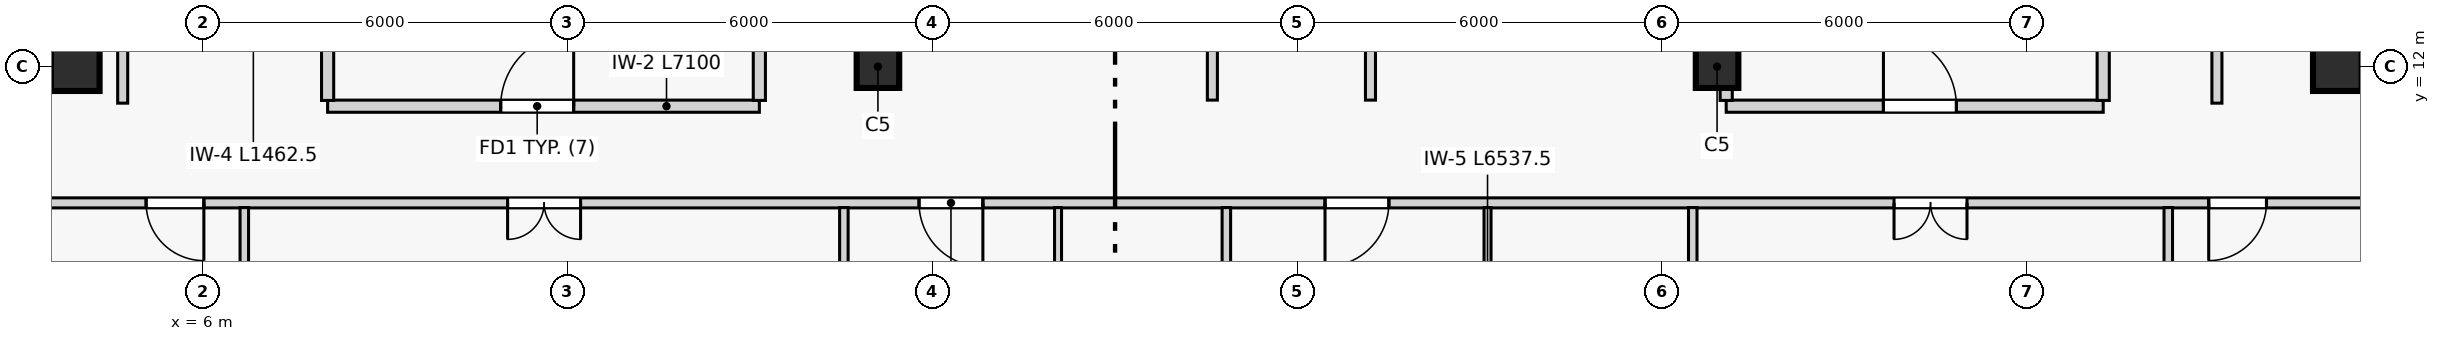
"""IFC4 building model, lengths in metres.
Left out: names, types, materials, properties, quantities, classifications, styles, units other than length and angle.
Written with IfcOpenShell. Run it as: python <this file> out.ifc"""

import sys

from ifc_helpers import new_model, si_unit, direction, frame, frame_2d, origin, origin_2d, place, context, subcontext, project, spatial, rectangle, extrude, source, transform, mapped, element, fill, save


model = new_model("IFC4")
c1 = context("Model", 3, precision=1e-05, world=origin(), true_north=direction((0.0, 1.0)))
c2 = subcontext(c1, "Body", "Model", "MODEL_VIEW")
j1 = project(units=[si_unit("LENGTHUNIT", "METRE"), si_unit("PLANEANGLEUNIT", "RADIAN")], contexts=[c1])
p1 = place(None, origin())
s1 = spatial("IfcSite", under=j1, at=p1, CompositionType="ELEMENT")
p2 = place(p1, origin())
s2 = spatial("IfcBuilding", under=s1, at=p2, CompositionType="ELEMENT")
p3 = place(p2, frame((0.0, 0.0, 267.3)))
s3 = spatial("IfcBuildingStorey", under=s2, at=p3, CompositionType="ELEMENT", Elevation=267.3)
m1 = source(origin(), c2, "Body", "SweptSolid", [
    extrude(rectangle(XDim=0.8, YDim=0.8, at=origin_2d()), origin(), (0.0, 0.0, 1.0), 3.6),
])
for number, where, z_axis, x_axis in (
    (1, (3.9, 12.0, 0.0), (0.0, 0.0, 1.0), (1.0, 0.0, 0.0)),
    (2, (41.1, 12.0, 0.0), (0.0, 0.0, 1.0), (1.0, 0.0, 0.0)),
):
    element("IfcColumn", number, at=place(p3, frame(where, z_axis=z_axis, x_axis=x_axis)), inside=s3, PredefinedType="COLUMN", context=c2, shape_type="MappedRepresentation", body=[
        mapped(m1, transform((0.0, 0.0, 0.0), scale=1.0)),
    ])
m2 = source(origin(), c2, "Body", "SweptSolid", [
    extrude(rectangle(XDim=0.7, YDim=0.7, at=origin_2d()), origin(), (0.0, 0.0, 1.0), 3.6),
])
for number, where, z_axis, x_axis in (
    (3, (17.1, 12.0, 0.0), (0.0, 0.0, 1.0), (1.0, 0.0, 0.0)),
    (4, (30.9, 12.0, 0.0), (0.0, 0.0, 1.0), (1.0, 0.0, 0.0)),
):
    element("IfcColumn", number, at=place(p3, frame(where, z_axis=z_axis, x_axis=x_axis)), inside=s3, PredefinedType="COLUMN", context=c2, shape_type="MappedRepresentation", body=[
        mapped(m2, transform((0.0, 0.0, 0.0), scale=1.0)),
    ])
p4 = place(p3, frame((8.05, 11.35, 0.0), z_axis=(0.0, 0.0, 1.0), x_axis=(1.0, 0.0, 0.0)))
e5 = element("IfcWall", 5, at=p4, inside=s3, PredefinedType="PARTITIONING", context=c2, shape_type="SweptSolid", body=[
    extrude(rectangle(XDim=7.1, YDim=0.2, at=frame_2d((3.55, 0.0))), origin(), (0.0, 0.0, 1.0), 3.32),
])
p5 = place(p4, frame((2.846, 0.0, 0.0)))
e6 = element("IfcOpeningElement", 6, at=p5, cuts=e5, PredefinedType="OPENING", context=c2, shape_type="SweptSolid", body=[
    extrude(rectangle(XDim=1.2, YDim=2.2, at=frame_2d((0.6, 1.1))), frame((0.0, 0.11, 0.0), z_axis=(0.0, -1.0, 0.0), x_axis=(1.0, 0.0, 0.0)), (0.0, 0.0, 1.0), 0.22),
])
for number, where, z_axis, x_axis in (
    (7, (8.05, 11.445, 0.0), (0.0, 0.0, 1.0), (0.0, 1.0, 0.0)),
    (8, (15.15, 11.445, 0.0), (0.0, 0.0, 1.0), (0.0, 1.0, 0.0)),
):
    element("IfcWall", number, at=place(p3, frame(where, z_axis=z_axis, x_axis=x_axis)), inside=s3, PredefinedType="PARTITIONING", context=c2, shape_type="SweptSolid", body=[
        extrude(rectangle(XDim=3.335, YDim=0.2, at=frame_2d((1.667, 0.0))), origin(), (0.0, 0.0, 1.0), 3.32),
    ])
p6 = place(p3, frame((31.05, 11.35, 0.0), z_axis=(0.0, 0.0, 1.0), x_axis=(1.0, 0.0, 0.0)))
e9 = element("IfcWall", 9, at=p6, inside=s3, PredefinedType="PARTITIONING", context=c2, shape_type="SweptSolid", body=[
    extrude(rectangle(XDim=6.2, YDim=0.2, at=frame_2d((3.1, 0.0))), origin(), (0.0, 0.0, 1.0), 3.32),
])
p7 = place(p6, frame((2.586, 0.0, 0.0)))
e10 = element("IfcOpeningElement", 10, at=p7, cuts=e9, PredefinedType="OPENING", context=c2, shape_type="SweptSolid", body=[
    extrude(rectangle(XDim=1.2, YDim=2.2, at=frame_2d((0.6, 1.1))), frame((0.0, 0.11, 0.0), z_axis=(0.0, -1.0, 0.0), x_axis=(1.0, 0.0, 0.0)), (0.0, 0.0, 1.0), 0.22),
])
p8 = place(p3, frame((31.05, 11.445, 0.0), z_axis=(0.0, 0.0, 1.0), x_axis=(0.0, 1.0, 0.0)))
e11 = element("IfcWall", 11, at=p8, inside=s3, PredefinedType="PARTITIONING", context=c2, shape_type="SweptSolid", body=[
    extrude(rectangle(XDim=3.335, YDim=0.2, at=frame_2d((1.667, 0.0))), origin(), (0.0, 0.0, 1.0), 2.47),
])
p9 = place(p3, frame((37.25, 11.445, 0.0), z_axis=(0.0, 0.0, 1.0), x_axis=(0.0, 1.0, 0.0)))
e12 = element("IfcWall", 12, at=p9, inside=s3, PredefinedType="PARTITIONING", context=c2, shape_type="SweptSolid", body=[
    extrude(rectangle(XDim=3.335, YDim=0.2, at=frame_2d((1.667, 0.0))), origin(), (0.0, 0.0, 1.0), 3.32),
])
p10 = place(p3, frame((3.145, 9.76, 0.0), z_axis=(0.0, 0.0, 1.0), x_axis=(1.0, 0.0, 0.0)))
e13 = element("IfcWall", 13, at=p10, inside=s3, PredefinedType="PARTITIONING", context=c2, shape_type="SweptSolid", body=[
    extrude(rectangle(XDim=38.71, YDim=0.165, at=frame_2d((19.355, 0.0))), origin(), (0.0, 0.0, 1.0), 3.32),
])
p11 = place(p10, frame((7.865, 0.0, 0.0)))
e14 = element("IfcOpeningElement", 14, at=p11, cuts=e13, PredefinedType="OPENING", context=c2, shape_type="SweptSolid", body=[
    extrude(rectangle(XDim=1.2, YDim=2.2, at=frame_2d((0.6, 1.1))), frame((0.0, 0.093, 0.0), z_axis=(0.0, -1.0, 0.0), x_axis=(1.0, 0.0, 0.0)), (0.0, 0.0, 1.0), 0.185),
])
p12 = place(p10, frame((14.631, 0.0, 0.0)))
e15 = element("IfcOpeningElement", 15, at=p12, cuts=e13, PredefinedType="OPENING", context=c2, shape_type="SweptSolid", body=[
    extrude(rectangle(XDim=1.05, YDim=2.15, at=frame_2d((0.525, 1.075))), frame((0.0, 0.093, 0.0), z_axis=(0.0, -1.0, 0.0), x_axis=(1.0, 0.0, 0.0)), (0.0, 0.0, 1.0), 0.185),
])
p13 = place(p10, frame((21.308, 0.0, 0.0)))
e16 = element("IfcOpeningElement", 16, at=p13, cuts=e13, PredefinedType="OPENING", context=c2, shape_type="SweptSolid", body=[
    extrude(rectangle(XDim=1.05, YDim=2.15, at=frame_2d((0.525, 1.075))), frame((0.0, 0.093, 0.0), z_axis=(0.0, -1.0, 0.0), x_axis=(1.0, 0.0, 0.0)), (0.0, 0.0, 1.0), 0.185),
])
p14 = place(p10, frame((30.665, 0.0, 0.0)))
e17 = element("IfcOpeningElement", 17, at=p14, cuts=e13, PredefinedType="OPENING", context=c2, shape_type="SweptSolid", body=[
    extrude(rectangle(XDim=1.2, YDim=2.2, at=frame_2d((0.6, 1.1))), frame((0.0, 0.093, 0.0), z_axis=(0.0, -1.0, 0.0), x_axis=(1.0, 0.0, 0.0)), (0.0, 0.0, 1.0), 0.185),
])
p15 = place(p10, frame((1.92, 0.0, 0.0)))
e18 = element("IfcOpeningElement", 18, at=p15, cuts=e13, PredefinedType="OPENING", context=c2, shape_type="SweptSolid", body=[
    extrude(rectangle(XDim=0.95, YDim=2.1, at=frame_2d((0.475, 1.05))), frame((0.0, 0.093, 0.0), z_axis=(0.0, -1.0, 0.0), x_axis=(1.0, 0.0, 0.0)), (0.0, 0.0, 1.0), 0.185),
])
p16 = place(p10, frame((35.84, 0.0, 0.0)))
e19 = element("IfcOpeningElement", 19, at=p16, cuts=e13, PredefinedType="OPENING", context=c2, shape_type="SweptSolid", body=[
    extrude(rectangle(XDim=0.95, YDim=2.1, at=frame_2d((0.475, 1.05))), frame((0.0, 0.093, 0.0), z_axis=(0.0, -1.0, 0.0), x_axis=(1.0, 0.0, 0.0)), (0.0, 0.0, 1.0), 0.185),
])
p17 = place(p3, frame((22.6, 11.45, 0.0), z_axis=(0.0, 0.0, 1.0), x_axis=(0.0, 1.0, 0.0)))
e20 = element("IfcWall", 20, at=p17, inside=s3, PredefinedType="PARTITIONING", context=c2, shape_type="SweptSolid", body=[
    extrude(rectangle(XDim=18.9, YDim=0.165, at=frame_2d((9.45, 0.0))), origin(), (0.0, 0.0, 1.0), 3.32),
])
p18 = place(p17, frame((8.825, 0.0, 0.0)))
e21 = element("IfcOpeningElement", 21, at=p18, cuts=e20, PredefinedType="OPENING", context=c2, shape_type="SweptSolid", body=[
    extrude(rectangle(XDim=1.25, YDim=2.2, at=frame_2d((0.625, 1.1))), frame((0.0, 0.093, 0.0), z_axis=(0.0, -1.0, 0.0), x_axis=(1.0, 0.0, 0.0)), (0.0, 0.0, 1.0), 0.185),
])
p19 = place(p3, frame((25.2, 11.45, 0.0), z_axis=(0.0, 0.0, 1.0), x_axis=(0.0, 1.0, 0.0)))
e22 = element("IfcWall", 22, at=p19, inside=s3, PredefinedType="PARTITIONING", context=c2, shape_type="SweptSolid", body=[
    extrude(rectangle(XDim=18.9, YDim=0.165, at=frame_2d((9.45, 0.0))), origin(), (0.0, 0.0, 1.0), 3.32),
])
p20 = place(p19, frame((8.825, 0.0, 0.0)))
e23 = element("IfcOpeningElement", 23, at=p20, cuts=e22, PredefinedType="OPENING", context=c2, shape_type="SweptSolid", body=[
    extrude(rectangle(XDim=1.25, YDim=2.2, at=frame_2d((0.625, 1.1))), frame((0.0, 0.093, 0.0), z_axis=(0.0, -1.0, 0.0), x_axis=(1.0, 0.0, 0.0)), (0.0, 0.0, 1.0), 0.185),
])
p21 = place(p3, frame((4.68, 11.4, 0.0), z_axis=(0.0, 0.0, 1.0), x_axis=(0.0, 1.0, 0.0)))
e24 = element("IfcWall", 24, at=p21, inside=s3, PredefinedType="PARTITIONING", context=c2, shape_type="SweptSolid", body=[
    extrude(rectangle(XDim=3.75, YDim=0.165, at=frame_2d((1.875, 0.0))), origin(), (0.0, 0.0, 1.0), 3.32),
])
p22 = place(p21, frame((1.5, 0.0, 0.0)))
e25 = element("IfcOpeningElement", 25, at=p22, cuts=e24, PredefinedType="OPENING", context=c2, shape_type="SweptSolid", body=[
    extrude(rectangle(XDim=0.95, YDim=2.1, at=frame_2d((0.475, 1.05))), frame((0.0, 0.093, 0.0), z_axis=(0.0, -1.0, 0.0), x_axis=(1.0, 0.0, 0.0)), (0.0, 0.0, 1.0), 0.185),
])
p23 = place(p3, frame((39.12, 11.4, 0.0), z_axis=(0.0, 0.0, 1.0), x_axis=(0.0, 1.0, 0.0)))
e26 = element("IfcWall", 26, at=p23, inside=s3, PredefinedType="PARTITIONING", context=c2, shape_type="SweptSolid", body=[
    extrude(rectangle(XDim=18.95, YDim=0.165, at=frame_2d((9.475, 0.0))), origin(), (0.0, 0.0, 1.0), 3.32),
])
p24 = place(p23, frame((2.075, 0.0, 0.0)))
e27 = element("IfcOpeningElement", 27, at=p24, cuts=e26, PredefinedType="OPENING", context=c2, shape_type="SweptSolid", body=[
    extrude(rectangle(XDim=0.95, YDim=2.1, at=frame_2d((0.475, 1.05))), frame((0.0, 0.093, 0.0), z_axis=(0.0, -1.0, 0.0), x_axis=(1.0, 0.0, 0.0)), (0.0, 0.0, 1.0), 0.185),
])
p25 = place(p3, frame((6.68, 4.945, 0.0), z_axis=(0.0, 0.0, 1.0), x_axis=(0.0, 1.0, 0.0)))
e28 = element("IfcWall", 28, at=p25, inside=s3, PredefinedType="PARTITIONING", context=c2, shape_type="SweptSolid", body=[
    extrude(rectangle(XDim=4.738, YDim=0.14, at=frame_2d((2.369, 0.0))), origin(), (0.0, 0.0, 1.0), 3.32),
])
for number, where, z_axis, x_axis in (
    (29, (16.54, 3.145, 0.0), (0.0, 0.0, 1.0), (0.0, 1.0, 0.0)),
    (30, (22.83, 3.145, 0.0), (0.0, 0.0, 1.0), (0.0, 1.0, 0.0)),
):
    element("IfcWall", number, at=place(p3, frame(where, z_axis=z_axis, x_axis=x_axis)), inside=s3, PredefinedType="PARTITIONING", context=c2, shape_type="SweptSolid", body=[
        extrude(rectangle(XDim=6.538, YDim=0.14, at=frame_2d((3.269, 0.0))), origin(), (0.0, 0.0, 1.0), 3.32),
    ])
p26 = place(p3, frame((30.5, 3.145, 0.0), z_axis=(0.0, 0.0, 1.0), x_axis=(0.0, 1.0, 0.0)))
e31 = element("IfcWall", 31, at=p26, inside=s3, PredefinedType="PARTITIONING", context=c2, shape_type="SweptSolid", body=[
    extrude(rectangle(XDim=6.538, YDim=0.14, at=frame_2d((3.269, 0.0))), origin(), (0.0, 0.0, 1.0), 2.47),
])
p27 = place(p3, frame((38.32, 4.945, 0.0), z_axis=(0.0, 0.0, 1.0), x_axis=(0.0, 1.0, 0.0)))
e32 = element("IfcWall", 32, at=p27, inside=s3, PredefinedType="PARTITIONING", context=c2, shape_type="SweptSolid", body=[
    extrude(rectangle(XDim=4.738, YDim=0.14, at=frame_2d((2.369, 0.0))), origin(), (0.0, 0.0, 1.0), 3.32),
])
p28 = place(p3, frame((20.062, 3.145, 0.0), z_axis=(0.0, 0.0, 1.0), x_axis=(0.0, 1.0, 0.0)))
e33 = element("IfcWall", 33, at=p28, inside=s3, PredefinedType="PARTITIONING", context=c2, shape_type="SweptSolid", body=[
    extrude(rectangle(XDim=6.538, YDim=0.115, at=frame_2d((3.269, 0.0))), origin(), (0.0, 0.0, 1.0), 3.32),
])
p29 = place(p28, frame((1.37, 0.0, 0.0)))
e34 = element("IfcOpeningElement", 34, at=p29, cuts=e33, PredefinedType="OPENING", context=c2, shape_type="SweptSolid", body=[
    extrude(rectangle(XDim=0.9, YDim=2.1, at=frame_2d((0.45, 1.05))), frame((0.0, 0.067, 0.0), z_axis=(0.0, -1.0, 0.0), x_axis=(1.0, 0.0, 0.0)), (0.0, 0.0, 1.0), 0.135),
])
p30 = place(p28, frame((4.36, 0.0, 0.0)))
e35 = element("IfcOpeningElement", 35, at=p30, cuts=e33, PredefinedType="OPENING", context=c2, shape_type="SweptSolid", body=[
    extrude(rectangle(XDim=0.9, YDim=2.1, at=frame_2d((0.45, 1.05))), frame((0.0, 0.067, 0.0), z_axis=(0.0, -1.0, 0.0), x_axis=(1.0, 0.0, 0.0)), (0.0, 0.0, 1.0), 0.135),
])
p31 = place(p3, frame((27.125, 3.145, 0.0), z_axis=(0.0, 0.0, 1.0), x_axis=(0.0, 1.0, 0.0)))
e36 = element("IfcWall", 36, at=p31, inside=s3, PredefinedType="PARTITIONING", context=c2, shape_type="SweptSolid", body=[
    extrude(rectangle(XDim=6.538, YDim=0.115, at=frame_2d((3.269, 0.0))), origin(), (0.0, 0.0, 1.0), 3.32),
])
p32 = place(p31, frame((1.37, 0.0, 0.0)))
e37 = element("IfcOpeningElement", 37, at=p32, cuts=e36, PredefinedType="OPENING", context=c2, shape_type="SweptSolid", body=[
    extrude(rectangle(XDim=0.9, YDim=2.1, at=frame_2d((0.45, 1.05))), frame((0.0, 0.067, 0.0), z_axis=(0.0, -1.0, 0.0), x_axis=(1.0, 0.0, 0.0)), (0.0, 0.0, 1.0), 0.135),
])
p33 = place(p31, frame((4.36, 0.0, 0.0)))
e38 = element("IfcOpeningElement", 38, at=p33, cuts=e36, PredefinedType="OPENING", context=c2, shape_type="SweptSolid", body=[
    extrude(rectangle(XDim=0.9, YDim=2.1, at=frame_2d((0.45, 1.05))), frame((0.0, 0.067, 0.0), z_axis=(0.0, -1.0, 0.0), x_axis=(1.0, 0.0, 0.0)), (0.0, 0.0, 1.0), 0.135),
])
m3 = source(origin(), c2, "Body", "SweptSolid", [
    extrude(rectangle(XDim=1.2, YDim=2.2, at=frame_2d((0.6, 1.1))), frame((0.0, 0.025, 0.0), z_axis=(0.0, -1.0, 0.0), x_axis=(1.0, 0.0, 0.0)), (0.0, 0.0, 1.0), 0.05),
])
p34 = place(p5, origin())
e39 = element("IfcDoor", 39, at=p34, inside=s3, OperationType="SINGLE_SWING_RIGHT", PredefinedType="DOOR", context=c2, shape_type="MappedRepresentation", body=[
    mapped(m3, transform((0.0, 0.0, 0.0), scale=1.0)),
])
fill(e6, e39)
p35 = place(p7, origin())
e40 = element("IfcDoor", 40, at=p35, inside=s3, OperationType="SINGLE_SWING_LEFT", PredefinedType="DOOR", context=c2, shape_type="MappedRepresentation", body=[
    mapped(m3, transform((0.0, 0.0, 0.0), scale=1.0)),
])
fill(e10, e40)
p36 = place(p11, frame((1.2, 0.0, 0.0), z_axis=(0.0, 0.0, 1.0), x_axis=(-1.0, 0.0, 0.0)))
e41 = element("IfcDoor", 41, at=p36, inside=s3, OperationType="DOUBLE_DOOR_SINGLE_SWING", PredefinedType="DOOR", context=c2, shape_type="MappedRepresentation", body=[
    mapped(m3, transform((0.0, 0.0, 0.0), scale=1.0)),
])
fill(e14, e41)
m4 = source(origin(), c2, "Body", "SweptSolid", [
    extrude(rectangle(XDim=1.05, YDim=2.15, at=frame_2d((0.525, 1.075))), frame((0.0, 0.025, 0.0), z_axis=(0.0, -1.0, 0.0), x_axis=(1.0, 0.0, 0.0)), (0.0, 0.0, 1.0), 0.05),
])
p37 = place(p12, frame((1.05, 0.0, 0.0), z_axis=(0.0, 0.0, 1.0), x_axis=(-1.0, 0.0, 0.0)))
e42 = element("IfcDoor", 42, at=p37, inside=s3, OperationType="SINGLE_SWING_LEFT", PredefinedType="DOOR", context=c2, shape_type="MappedRepresentation", body=[
    mapped(m4, transform((0.0, 0.0, 0.0), scale=1.0)),
])
fill(e15, e42)
p38 = place(p13, frame((1.05, 0.0, 0.0), z_axis=(0.0, 0.0, 1.0), x_axis=(-1.0, 0.0, 0.0)))
e43 = element("IfcDoor", 43, at=p38, inside=s3, OperationType="SINGLE_SWING_RIGHT", PredefinedType="DOOR", context=c2, shape_type="MappedRepresentation", body=[
    mapped(m4, transform((0.0, 0.0, 0.0), scale=1.0)),
])
fill(e16, e43)
p39 = place(p14, frame((1.2, 0.0, 0.0), z_axis=(0.0, 0.0, 1.0), x_axis=(-1.0, 0.0, 0.0)))
e44 = element("IfcDoor", 44, at=p39, inside=s3, OperationType="DOUBLE_DOOR_SINGLE_SWING", PredefinedType="DOOR", context=c2, shape_type="MappedRepresentation", body=[
    mapped(m3, transform((0.0, 0.0, 0.0), scale=1.0)),
])
fill(e17, e44)
m5 = source(origin(), c2, "Body", "SweptSolid", [
    extrude(rectangle(XDim=0.95, YDim=2.1, at=frame_2d((0.475, 1.05))), frame((0.0, 0.025, 0.0), z_axis=(0.0, -1.0, 0.0), x_axis=(1.0, 0.0, 0.0)), (0.0, 0.0, 1.0), 0.05),
])
p40 = place(p15, frame((0.95, 0.0, 0.0), z_axis=(0.0, 0.0, 1.0), x_axis=(-1.0, 0.0, 0.0)))
e45 = element("IfcDoor", 45, at=p40, inside=s3, OperationType="SINGLE_SWING_LEFT", PredefinedType="DOOR", context=c2, shape_type="MappedRepresentation", body=[
    mapped(m5, transform((0.0, 0.0, 0.0), scale=1.0)),
])
fill(e18, e45)
p41 = place(p16, frame((0.95, 0.0, 0.0), z_axis=(0.0, 0.0, 1.0), x_axis=(-1.0, 0.0, 0.0)))
e46 = element("IfcDoor", 46, at=p41, inside=s3, OperationType="SINGLE_SWING_RIGHT", PredefinedType="DOOR", context=c2, shape_type="MappedRepresentation", body=[
    mapped(m5, transform((0.0, 0.0, 0.0), scale=1.0)),
])
fill(e19, e46)
save(model, sys.argv[1])
